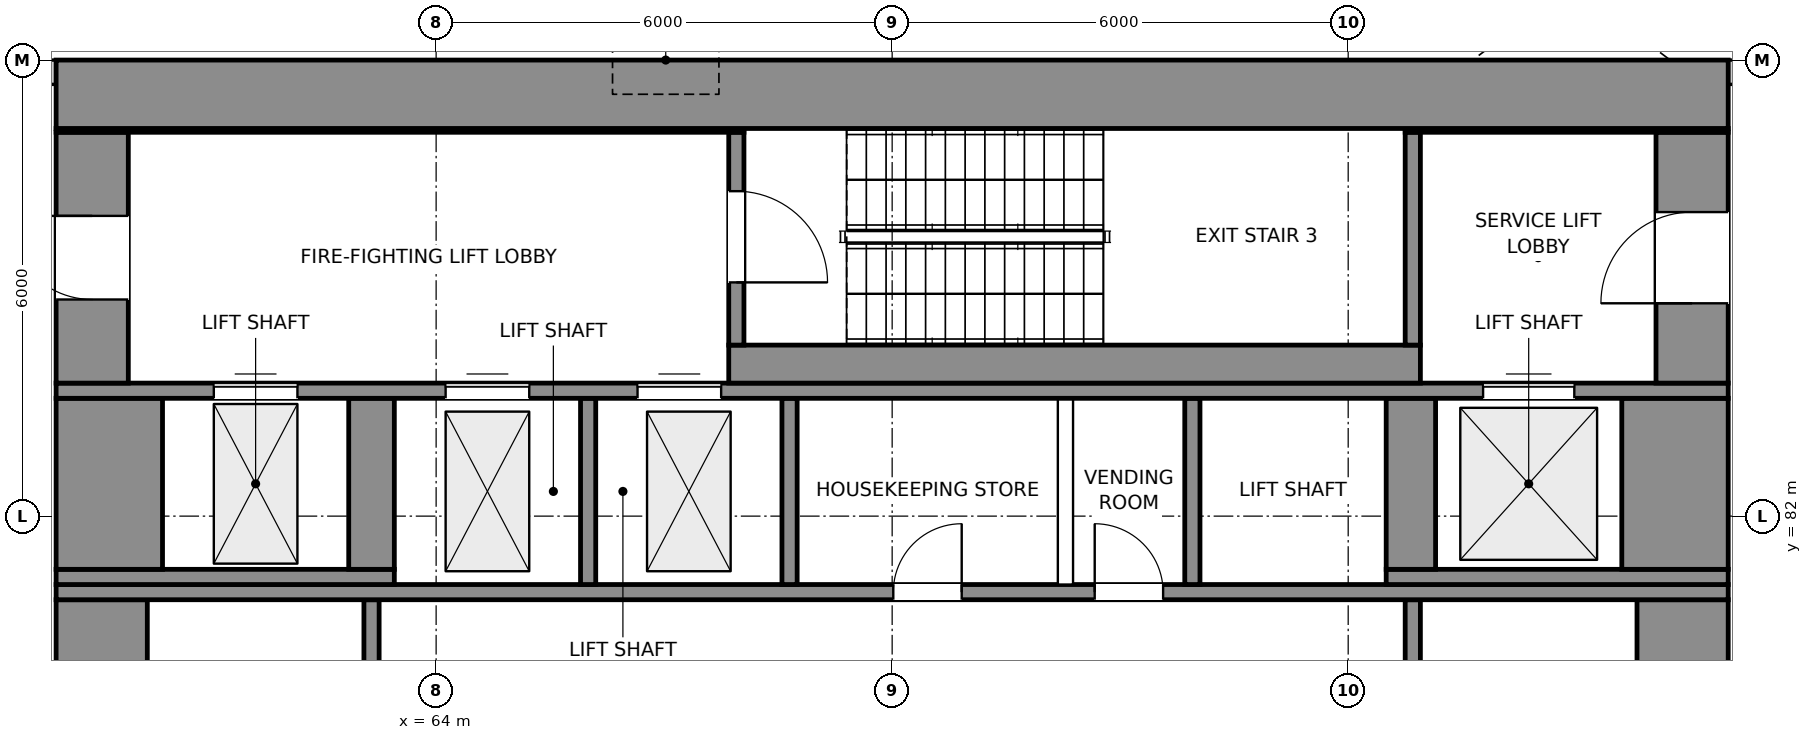
"""IFC4 building model, lengths in metres.
Left out: names, types, materials, properties, quantities, classifications, styles, units other than length and angle.
Written with IfcOpenShell. Run it as: python <this file> out.ifc"""

import sys

from ifc_helpers import new_model, si_unit, direction, frame, frame_2d, origin, place, context, subcontext, project, spatial, rectangle, extrude, element, fill, save


model = new_model("IFC4")
c1 = context("Model", 3, precision=1e-05, world=origin(), true_north=direction((0.0, 1.0)))
c2 = subcontext(c1, "Body", "Model", "MODEL_VIEW")
j1 = project(units=[si_unit("LENGTHUNIT", "METRE"), si_unit("PLANEANGLEUNIT", "RADIAN")], contexts=[c1])
p1 = place(None, origin())
s1 = spatial("IfcSite", under=j1, at=p1, CompositionType="ELEMENT")
p2 = place(p1, origin())
s2 = spatial("IfcBuilding", under=s1, at=p2, CompositionType="ELEMENT")
p3 = place(p2, frame((0.0, 0.0, 191.5)))
s3 = spatial("IfcBuildingStorey", under=s2, at=p3, CompositionType="ELEMENT", Elevation=191.5)
for number, where, z_axis, x_axis in (
    (1, (81.385, 87.84, 0.0), (0.0, 0.0, 1.0), (-1.0, 0.0, 0.0)),
    (2, (59.0, 87.84, 0.0), (0.0, 0.0, 1.0), (-1.0, 0.0, 0.0)),
):
    element("IfcWall", number, at=place(p3, frame(where, z_axis=z_axis, x_axis=x_axis)), inside=s3, PredefinedType="SOLIDWALL", context=c2, shape_type="SweptSolid", body=[
        extrude(rectangle(XDim=0.385, YDim=0.32, at=frame_2d((0.192, 0.0))), origin(), (0.0, 0.0, 1.0), 4.7),
    ])
for number, where, z_axis, x_axis in (
    (3, (59.6, 71.95, 0.0), (0.0, 0.0, 1.0), (0.0, 1.0, 0.0)),
    (4, (80.4, 71.95, 0.0), (0.0, 0.0, 1.0), (0.0, 1.0, 0.0)),
):
    element("IfcWall", number, at=place(p3, frame(where, z_axis=z_axis, x_axis=x_axis)), inside=s3, PredefinedType="SHEAR", context=c2, shape_type="SweptSolid", body=[
        extrude(rectangle(XDim=8.95, YDim=1.2, at=frame_2d((4.475, 0.0))), origin(), (0.0, 0.0, 1.0), 5.0),
    ])
for number, where, z_axis, x_axis in (
    (5, (63.15, 77.7, 0.0), (0.0, 0.0, 1.0), (0.0, 1.0, 0.0)),
    (6, (76.85, 77.7, 0.0), (0.0, 0.0, 1.0), (0.0, 1.0, 0.0)),
):
    element("IfcWall", number, at=place(p3, frame(where, z_axis=z_axis, x_axis=x_axis)), inside=s3, PredefinedType="SHEAR", context=c2, shape_type="SweptSolid", body=[
        extrude(rectangle(XDim=3.2, YDim=0.2, at=frame_2d((1.6, 0.0))), origin(), (0.0, 0.0, 1.0), 5.0),
    ])
p4 = place(p3, frame((59.0, 81.0, 0.0), z_axis=(0.0, 0.0, 1.0), x_axis=(1.0, 0.0, 0.0)))
e7 = element("IfcWall", 7, at=p4, inside=s3, PredefinedType="SHEAR", context=c2, shape_type="SweptSolid", body=[
    extrude(rectangle(XDim=22.0, YDim=0.2, at=frame_2d((11.0, 0.0))), origin(), (0.0, 0.0, 1.0), 5.0),
])
p5 = place(p4, frame((11.015, 0.0, 0.0)))
e8 = element("IfcOpeningElement", 8, at=p5, cuts=e7, PredefinedType="OPENING", context=c2, shape_type="SweptSolid", body=[
    extrude(rectangle(XDim=0.9, YDim=2.1, at=frame_2d((0.45, 1.05))), frame((0.0, 0.11, 0.0), z_axis=(0.0, -1.0, 0.0), x_axis=(1.0, 0.0, 0.0)), (0.0, 0.0, 1.0), 0.22),
])
p6 = place(p4, frame((13.665, 0.0, 0.0)))
e9 = element("IfcOpeningElement", 9, at=p6, cuts=e7, PredefinedType="OPENING", context=c2, shape_type="SweptSolid", body=[
    extrude(rectangle(XDim=0.9, YDim=2.1, at=frame_2d((0.45, 1.05))), frame((0.0, 0.11, 0.0), z_axis=(0.0, -1.0, 0.0), x_axis=(1.0, 0.0, 0.0)), (0.0, 0.0, 1.0), 0.22),
])
p7 = place(p3, frame((59.0, 81.2, 0.0), z_axis=(0.0, 0.0, 1.0), x_axis=(1.0, 0.0, 0.0)))
e10 = element("IfcWall", 10, at=p7, inside=s3, PredefinedType="SHEAR", context=c2, shape_type="SweptSolid", body=[
    extrude(rectangle(XDim=4.45, YDim=0.2, at=frame_2d((2.225, 0.0))), origin(), (0.0, 0.0, 1.0), 5.0),
])
for number, where, z_axis, x_axis in (
    (11, (66.0, 81.1, 0.0), (0.0, 0.0, 1.0), (0.0, 1.0, 0.0)),
    (12, (68.65, 81.1, 0.0), (0.0, 0.0, 1.0), (0.0, 1.0, 0.0)),
):
    element("IfcWall", number, at=place(p3, frame(where, z_axis=z_axis, x_axis=x_axis)), inside=s3, PredefinedType="SHEAR", context=c2, shape_type="SweptSolid", body=[
        extrude(rectangle(XDim=2.45, YDim=0.2, at=frame_2d((1.225, 0.0))), origin(), (0.0, 0.0, 1.0), 5.0),
    ])
p8 = place(p3, frame((72.28, 81.1, 0.0), z_axis=(0.0, 0.0, 1.0), x_axis=(0.0, 1.0, 0.0)))
e13 = element("IfcWall", 13, at=p8, inside=s3, PredefinedType="PARTITIONING", context=c2, shape_type="SweptSolid", body=[
    extrude(rectangle(XDim=2.45, YDim=0.2, at=frame_2d((1.225, 0.0))), origin(), (0.0, 0.0, 1.0), 4.7),
])
p9 = place(p3, frame((73.95, 81.1, 0.0), z_axis=(0.0, 0.0, 1.0), x_axis=(0.0, 1.0, 0.0)))
e14 = element("IfcWall", 14, at=p9, inside=s3, PredefinedType="SHEAR", context=c2, shape_type="SweptSolid", body=[
    extrude(rectangle(XDim=2.45, YDim=0.2, at=frame_2d((1.225, 0.0))), origin(), (0.0, 0.0, 1.0), 5.0),
])
p10 = place(p3, frame((76.5, 81.2, 0.0), z_axis=(0.0, 0.0, 1.0), x_axis=(1.0, 0.0, 0.0)))
e15 = element("IfcWall", 15, at=p10, inside=s3, PredefinedType="SHEAR", context=c2, shape_type="SweptSolid", body=[
    extrude(rectangle(XDim=4.5, YDim=0.2, at=frame_2d((2.25, 0.0))), origin(), (0.0, 0.0, 1.0), 5.0),
])
p11 = place(p3, frame((59.7, 81.3, 0.0), z_axis=(0.0, 0.0, 1.0), x_axis=(0.0, 1.0, 0.0)))
e16 = element("IfcWall", 16, at=p11, inside=s3, PredefinedType="SHEAR", context=c2, shape_type="SweptSolid", body=[
    extrude(rectangle(XDim=2.25, YDim=1.4, at=frame_2d((1.125, 0.0))), origin(), (0.0, 0.0, 1.0), 5.0),
])
p12 = place(p3, frame((63.15, 81.3, 0.0), z_axis=(0.0, 0.0, 1.0), x_axis=(0.0, 1.0, 0.0)))
e17 = element("IfcWall", 17, at=p12, inside=s3, PredefinedType="SHEAR", context=c2, shape_type="SweptSolid", body=[
    extrude(rectangle(XDim=2.25, YDim=0.6, at=frame_2d((1.125, 0.0))), origin(), (0.0, 0.0, 1.0), 5.0),
])
p13 = place(p3, frame((76.825, 81.3, 0.0), z_axis=(0.0, 0.0, 1.0), x_axis=(0.0, 1.0, 0.0)))
e18 = element("IfcWall", 18, at=p13, inside=s3, PredefinedType="SHEAR", context=c2, shape_type="SweptSolid", body=[
    extrude(rectangle(XDim=2.25, YDim=0.65, at=frame_2d((1.125, 0.0))), origin(), (0.0, 0.0, 1.0), 5.0),
])
p14 = place(p3, frame((80.3, 81.3, 0.0), z_axis=(0.0, 0.0, 1.0), x_axis=(0.0, 1.0, 0.0)))
e19 = element("IfcWall", 19, at=p14, inside=s3, PredefinedType="SHEAR", context=c2, shape_type="SweptSolid", body=[
    extrude(rectangle(XDim=2.25, YDim=1.4, at=frame_2d((1.125, 0.0))), origin(), (0.0, 0.0, 1.0), 5.0),
])
p15 = place(p3, frame((59.0, 83.65, 0.0), z_axis=(0.0, 0.0, 1.0), x_axis=(1.0, 0.0, 0.0)))
e20 = element("IfcWall", 20, at=p15, inside=s3, PredefinedType="SHEAR", context=c2, shape_type="SweptSolid", body=[
    extrude(rectangle(XDim=22.0, YDim=0.2, at=frame_2d((11.0, 0.0))), origin(), (0.0, 0.0, 1.0), 5.0),
])
p16 = place(p15, frame((5.125, 0.0, 0.0)))
e21 = element("IfcOpeningElement", 21, at=p16, cuts=e20, PredefinedType="OPENING", context=c2, shape_type="SweptSolid", body=[
    extrude(rectangle(XDim=1.1, YDim=2.1, at=frame_2d((0.55, 1.05))), frame((0.0, 0.11, 0.0), z_axis=(0.0, -1.0, 0.0), x_axis=(1.0, 0.0, 0.0)), (0.0, 0.0, 1.0), 0.22),
])
p17 = place(p15, frame((7.65, 0.0, 0.0)))
e22 = element("IfcOpeningElement", 22, at=p17, cuts=e20, PredefinedType="OPENING", context=c2, shape_type="SweptSolid", body=[
    extrude(rectangle(XDim=1.1, YDim=2.1, at=frame_2d((0.55, 1.05))), frame((0.0, 0.11, 0.0), z_axis=(0.0, -1.0, 0.0), x_axis=(1.0, 0.0, 0.0)), (0.0, 0.0, 1.0), 0.22),
])
p18 = place(p15, frame((18.775, 0.0, 0.0)))
e23 = element("IfcOpeningElement", 23, at=p18, cuts=e20, PredefinedType="OPENING", context=c2, shape_type="SweptSolid", body=[
    extrude(rectangle(XDim=1.2, YDim=2.1, at=frame_2d((0.6, 1.05))), frame((0.0, 0.11, 0.0), z_axis=(0.0, -1.0, 0.0), x_axis=(1.0, 0.0, 0.0)), (0.0, 0.0, 1.0), 0.22),
])
p19 = place(p15, frame((2.075, 0.0, 0.0)))
e24 = element("IfcOpeningElement", 24, at=p19, cuts=e20, PredefinedType="OPENING", context=c2, shape_type="SweptSolid", body=[
    extrude(rectangle(XDim=1.1, YDim=2.1, at=frame_2d((0.55, 1.05))), frame((0.0, 0.11, 0.0), z_axis=(0.0, -1.0, 0.0), x_axis=(1.0, 0.0, 0.0)), (0.0, 0.0, 1.0), 0.22),
])
p20 = place(p3, frame((59.475, 83.75, 0.0), z_axis=(0.0, 0.0, 1.0), x_axis=(0.0, 1.0, 0.0)))
e25 = element("IfcWall", 25, at=p20, inside=s3, PredefinedType="SHEAR", context=c2, shape_type="SweptSolid", body=[
    extrude(rectangle(XDim=3.3, YDim=0.95, at=frame_2d((1.65, 0.0))), origin(), (0.0, 0.0, 1.0), 5.0),
])
p21 = place(p20, frame((1.1, 0.0, 0.0)))
e26 = element("IfcOpeningElement", 26, at=p21, cuts=e25, PredefinedType="OPENING", context=c2, shape_type="SweptSolid", body=[
    extrude(rectangle(XDim=1.1, YDim=2.1, at=frame_2d((0.55, 1.05))), frame((0.0, 0.485, 0.0), z_axis=(0.0, -1.0, 0.0), x_axis=(1.0, 0.0, 0.0)), (0.0, 0.0, 1.0), 0.97),
])
p22 = place(p3, frame((67.85, 84.0, 0.0), z_axis=(0.0, 0.0, 1.0), x_axis=(1.0, 0.0, 0.0)))
e27 = element("IfcWall", 27, at=p22, inside=s3, PredefinedType="SHEAR", context=c2, shape_type="SweptSolid", body=[
    extrude(rectangle(XDim=9.1, YDim=0.5, at=frame_2d((4.55, 0.0))), origin(), (0.0, 0.0, 1.0), 5.0),
])
p23 = place(p3, frame((80.525, 83.75, 0.0), z_axis=(0.0, 0.0, 1.0), x_axis=(0.0, 1.0, 0.0)))
e28 = element("IfcWall", 28, at=p23, inside=s3, PredefinedType="SHEAR", context=c2, shape_type="SweptSolid", body=[
    extrude(rectangle(XDim=3.3, YDim=0.95, at=frame_2d((1.65, 0.0))), origin(), (0.0, 0.0, 1.0), 5.0),
])
p24 = place(p23, frame((1.05, 0.0, 0.0)))
e29 = element("IfcOpeningElement", 29, at=p24, cuts=e28, PredefinedType="OPENING", context=c2, shape_type="SweptSolid", body=[
    extrude(rectangle(XDim=1.2, YDim=2.1, at=frame_2d((0.6, 1.05))), frame((0.0, 0.485, 0.0), z_axis=(0.0, -1.0, 0.0), x_axis=(1.0, 0.0, 0.0)), (0.0, 0.0, 1.0), 0.97),
])
p25 = place(p3, frame((67.95, 84.25, 0.0), z_axis=(0.0, 0.0, 1.0), x_axis=(0.0, 1.0, 0.0)))
e30 = element("IfcWall", 30, at=p25, inside=s3, PredefinedType="SHEAR", context=c2, shape_type="SweptSolid", body=[
    extrude(rectangle(XDim=2.8, YDim=0.2, at=frame_2d((1.4, 0.0))), origin(), (0.0, 0.0, 1.0), 5.0),
])
p26 = place(p25, frame((0.825, 0.0, 0.0)))
e31 = element("IfcOpeningElement", 31, at=p26, cuts=e30, PredefinedType="OPENING", context=c2, shape_type="SweptSolid", body=[
    extrude(rectangle(XDim=1.2, YDim=2.1, at=frame_2d((0.6, 1.05))), frame((0.0, 0.11, 0.0), z_axis=(0.0, -1.0, 0.0), x_axis=(1.0, 0.0, 0.0)), (0.0, 0.0, 1.0), 0.22),
])
p27 = place(p3, frame((76.85, 84.25, 0.0), z_axis=(0.0, 0.0, 1.0), x_axis=(0.0, 1.0, 0.0)))
e32 = element("IfcWall", 32, at=p27, inside=s3, PredefinedType="SHEAR", context=c2, shape_type="SweptSolid", body=[
    extrude(rectangle(XDim=2.8, YDim=0.2, at=frame_2d((1.4, 0.0))), origin(), (0.0, 0.0, 1.0), 5.0),
])
p28 = place(p3, frame((59.0, 87.075, 0.0), z_axis=(0.0, 0.0, 1.0), x_axis=(1.0, 0.0, 0.0)))
e33 = element("IfcWall", 33, at=p28, inside=s3, PredefinedType="SHEAR", context=c2, shape_type="SweptSolid", body=[
    extrude(rectangle(XDim=9.05, YDim=0.05, at=frame_2d((4.525, 0.0))), origin(), (0.0, 0.0, 1.0), 5.0),
])
p29 = place(p3, frame((76.75, 87.075, 0.0), z_axis=(0.0, 0.0, 1.0), x_axis=(1.0, 0.0, 0.0)))
e34 = element("IfcWall", 34, at=p29, inside=s3, PredefinedType="SHEAR", context=c2, shape_type="SweptSolid", body=[
    extrude(rectangle(XDim=4.25, YDim=0.05, at=frame_2d((2.125, 0.0))), origin(), (0.0, 0.0, 1.0), 5.0),
])
p30 = place(p3, frame((59.0, 87.55, 0.0), z_axis=(0.0, 0.0, 1.0), x_axis=(1.0, 0.0, 0.0)))
e35 = element("IfcWall", 35, at=p30, inside=s3, PredefinedType="SHEAR", context=c2, shape_type="SweptSolid", body=[
    extrude(rectangle(XDim=22.0, YDim=0.9, at=frame_2d((11.0, 0.0))), origin(), (0.0, 0.0, 1.0), 5.0),
])
p31 = place(p26, frame((1.2, 0.0, 0.0), z_axis=(0.0, 0.0, 1.0), x_axis=(-1.0, 0.0, 0.0)))
e36 = element("IfcDoor", 36, at=p31, inside=s3, OperationType="SINGLE_SWING_RIGHT", PredefinedType="DOOR", context=c2, shape_type="SweptSolid", body=[
    extrude(rectangle(XDim=1.2, YDim=2.1, at=frame_2d((0.6, 1.05))), frame((0.0, 0.025, 0.0), z_axis=(0.0, -1.0, 0.0), x_axis=(1.0, 0.0, 0.0)), (0.0, 0.0, 1.0), 0.05),
])
fill(e31, e36)
p32 = place(p21, origin())
e37 = element("IfcDoor", 37, at=p32, inside=s3, OperationType="SINGLE_SWING_RIGHT", PredefinedType="DOOR", context=c2, shape_type="SweptSolid", body=[
    extrude(rectangle(XDim=1.1, YDim=2.1, at=frame_2d((0.55, 1.05))), frame((0.0, 0.025, 0.0), z_axis=(0.0, -1.0, 0.0), x_axis=(1.0, 0.0, 0.0)), (0.0, 0.0, 1.0), 0.05),
])
fill(e26, e37)
p33 = place(p24, origin())
e38 = element("IfcDoor", 38, at=p33, inside=s3, OperationType="SINGLE_SWING_LEFT", PredefinedType="DOOR", context=c2, shape_type="SweptSolid", body=[
    extrude(rectangle(XDim=1.2, YDim=2.1, at=frame_2d((0.6, 1.05))), frame((0.0, 0.025, 0.0), z_axis=(0.0, -1.0, 0.0), x_axis=(1.0, 0.0, 0.0)), (0.0, 0.0, 1.0), 0.05),
])
fill(e29, e38)
p34 = place(p16, origin())
e39 = element("IfcDoor", 39, at=p34, inside=s3, OperationType="DOUBLE_DOOR_SLIDING", PredefinedType="DOOR", context=c2, shape_type="SweptSolid", body=[
    extrude(rectangle(XDim=1.1, YDim=2.1, at=frame_2d((0.55, 1.05))), frame((0.0, 0.025, 0.0), z_axis=(0.0, -1.0, 0.0), x_axis=(1.0, 0.0, 0.0)), (0.0, 0.0, 1.0), 0.05),
])
fill(e21, e39)
p35 = place(p17, origin())
e40 = element("IfcDoor", 40, at=p35, inside=s3, OperationType="DOUBLE_DOOR_SLIDING", PredefinedType="DOOR", context=c2, shape_type="SweptSolid", body=[
    extrude(rectangle(XDim=1.1, YDim=2.1, at=frame_2d((0.55, 1.05))), frame((0.0, 0.025, 0.0), z_axis=(0.0, -1.0, 0.0), x_axis=(1.0, 0.0, 0.0)), (0.0, 0.0, 1.0), 0.05),
])
fill(e22, e40)
p36 = place(p18, origin())
e41 = element("IfcDoor", 41, at=p36, inside=s3, OperationType="DOUBLE_DOOR_SLIDING", PredefinedType="DOOR", context=c2, shape_type="SweptSolid", body=[
    extrude(rectangle(XDim=1.2, YDim=2.1, at=frame_2d((0.6, 1.05))), frame((0.0, 0.025, 0.0), z_axis=(0.0, -1.0, 0.0), x_axis=(1.0, 0.0, 0.0)), (0.0, 0.0, 1.0), 0.05),
])
fill(e23, e41)
p37 = place(p19, origin())
e42 = element("IfcDoor", 42, at=p37, inside=s3, OperationType="DOUBLE_DOOR_SLIDING", PredefinedType="DOOR", context=c2, shape_type="SweptSolid", body=[
    extrude(rectangle(XDim=1.1, YDim=2.1, at=frame_2d((0.55, 1.05))), frame((0.0, 0.025, 0.0), z_axis=(0.0, -1.0, 0.0), x_axis=(1.0, 0.0, 0.0)), (0.0, 0.0, 1.0), 0.05),
])
fill(e24, e42)
p38 = place(p5, origin())
e43 = element("IfcDoor", 43, at=p38, inside=s3, OperationType="SINGLE_SWING_RIGHT", PredefinedType="DOOR", context=c2, shape_type="SweptSolid", body=[
    extrude(rectangle(XDim=0.9, YDim=2.1, at=frame_2d((0.45, 1.05))), frame((0.0, 0.025, 0.0), z_axis=(0.0, -1.0, 0.0), x_axis=(1.0, 0.0, 0.0)), (0.0, 0.0, 1.0), 0.05),
])
fill(e8, e43)
p39 = place(p6, origin())
e44 = element("IfcDoor", 44, at=p39, inside=s3, OperationType="SINGLE_SWING_LEFT", PredefinedType="DOOR", context=c2, shape_type="SweptSolid", body=[
    extrude(rectangle(XDim=0.9, YDim=2.1, at=frame_2d((0.45, 1.05))), frame((0.0, 0.025, 0.0), z_axis=(0.0, -1.0, 0.0), x_axis=(1.0, 0.0, 0.0)), (0.0, 0.0, 1.0), 0.05),
])
fill(e9, e44)
save(model, sys.argv[1])
